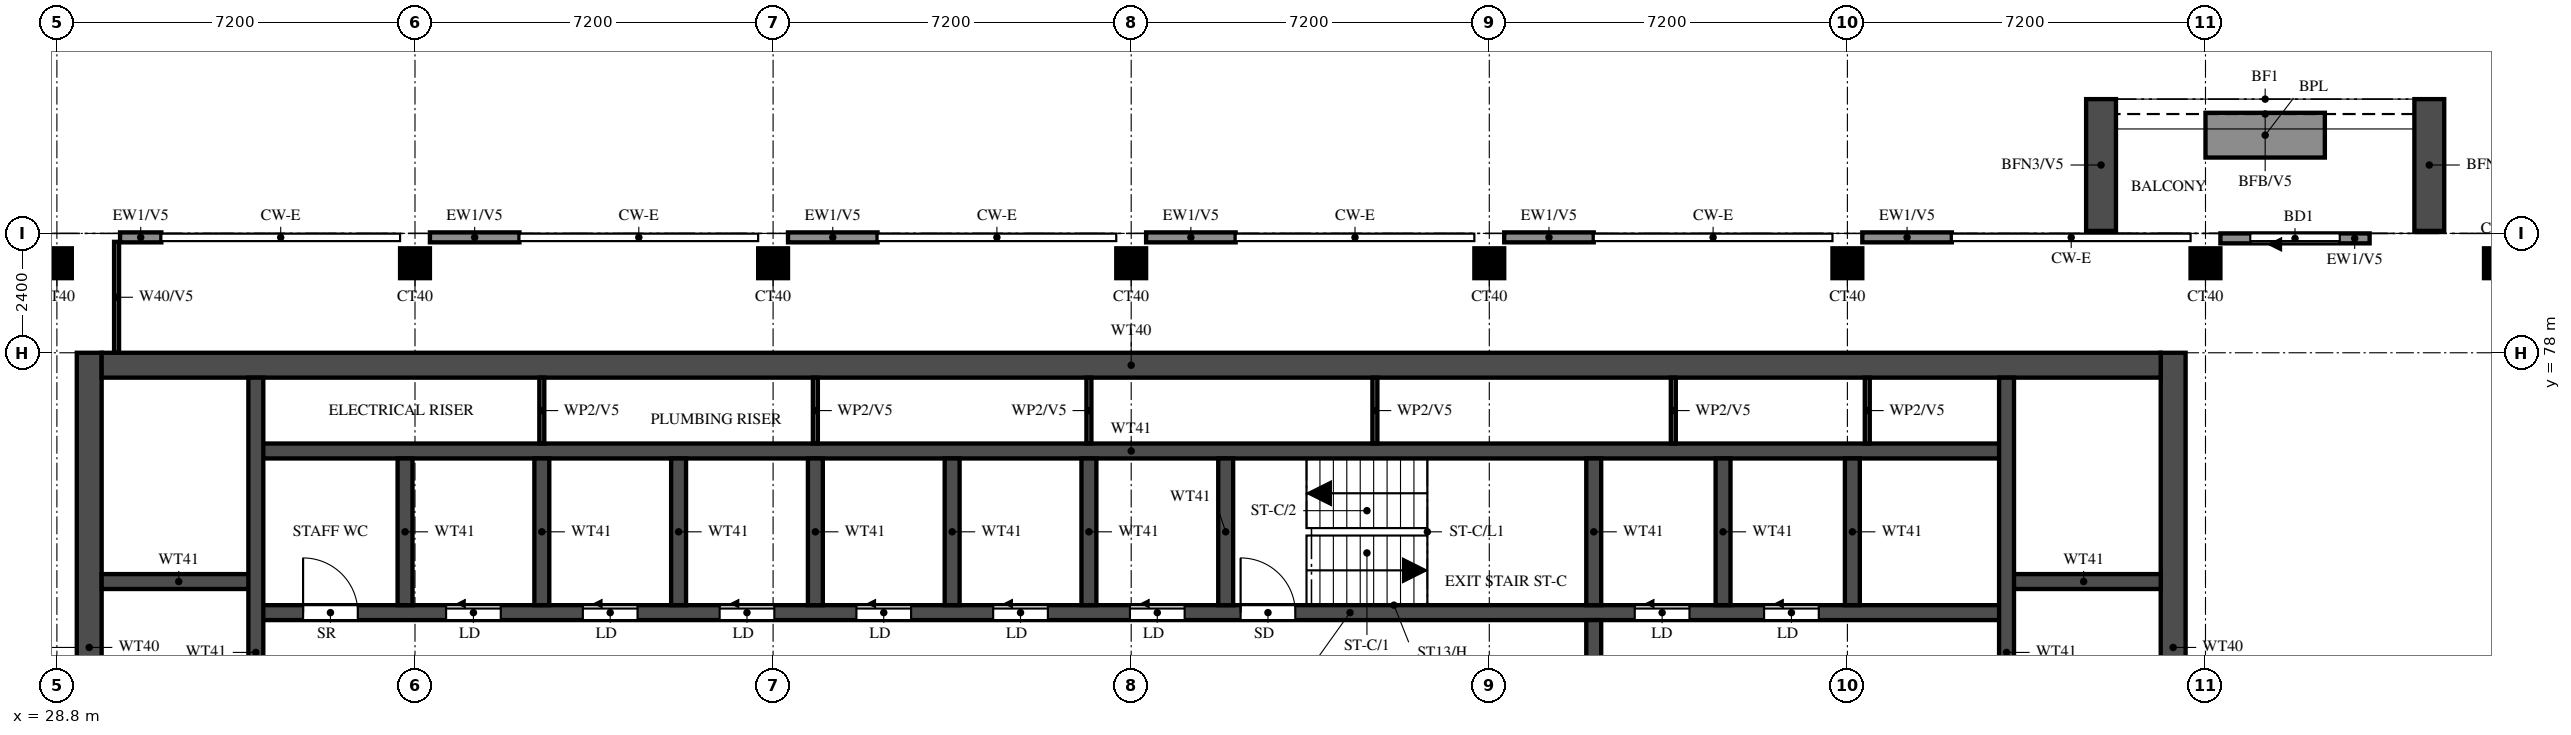
"""IFC4 building model, lengths in metres.
Left out: names, types, materials, properties, quantities, classifications, styles, units other than length and angle.
Written with IfcOpenShell. Run it as: python <this file> out.ifc"""

import sys

from ifc_helpers import new_model, si_unit, direction, frame, frame_2d, origin, origin_2d, place, context, subcontext, project, spatial, rectangle, extrude, source, transform, mapped, element, fill, save


model = new_model("IFC4")
c1 = context("Model", 3, precision=1e-05, world=origin(), true_north=direction((0.0, 1.0)))
c2 = subcontext(c1, "Body", "Model", "MODEL_VIEW")
j1 = project(units=[si_unit("LENGTHUNIT", "METRE"), si_unit("PLANEANGLEUNIT", "RADIAN")], contexts=[c1])
p1 = place(None, origin())
s1 = spatial("IfcSite", under=j1, at=p1, CompositionType="ELEMENT")
p2 = place(p1, origin())
s2 = spatial("IfcBuilding", under=s1, at=p2, CompositionType="ELEMENT")
p3 = place(p2, frame((0.0, 0.0, 271.0)))
s3 = spatial("IfcBuildingStorey", under=s2, at=p3, CompositionType="ELEMENT", Elevation=271.0)
m1 = source(origin(), c2, "Body", "SweptSolid", [
    extrude(rectangle(XDim=0.6, YDim=0.6, at=origin_2d()), origin(), (0.0, 0.0, 1.0), 3.15),
])
for number, where, z_axis, x_axis in (
    (1, (28.8, 79.8, 0.0), (0.0, 0.0, 1.0), (1.0, 0.0, 0.0)),
    (2, (36.0, 79.8, 0.0), (0.0, 0.0, 1.0), (1.0, 0.0, 0.0)),
    (3, (43.2, 79.8, 0.0), (0.0, 0.0, 1.0), (1.0, 0.0, 0.0)),
    (4, (50.4, 79.8, 0.0), (0.0, 0.0, 1.0), (1.0, 0.0, 0.0)),
    (5, (57.6, 79.8, 0.0), (0.0, 0.0, 1.0), (1.0, 0.0, 0.0)),
    (6, (64.8, 79.8, 0.0), (0.0, 0.0, 1.0), (1.0, 0.0, 0.0)),
    (7, (72.0, 79.8, 0.0), (0.0, 0.0, 1.0), (1.0, 0.0, 0.0)),
    (8, (77.9, 79.8, 0.0), (0.0, 0.0, 1.0), (1.0, 0.0, 0.0)),
):
    element("IfcColumn", number, at=place(p3, frame(where, z_axis=z_axis, x_axis=x_axis)), inside=s3, PredefinedType="COLUMN", context=c2, shape_type="MappedRepresentation", body=[
        mapped(m1, transform((0.0, 0.0, 0.0))),
    ])
for number, where, z_axis, x_axis in (
    (9, (29.45, 66.15, 0.0), (0.0, 0.0, 1.0), (0.0, 1.0, 0.0)),
    (10, (71.35, 66.15, 0.0), (0.0, 0.0, 1.0), (0.0, 1.0, 0.0)),
):
    element("IfcWall", number, at=place(p3, frame(where, z_axis=z_axis, x_axis=x_axis)), inside=s3, PredefinedType="SHEAR", context=c2, shape_type="SweptSolid", body=[
        extrude(rectangle(XDim=11.85, YDim=0.5, at=frame_2d((5.925, 0.0))), origin(), (0.0, 0.0, 1.0), 3.15),
    ])
p4 = place(p3, frame((29.7, 77.75, 0.0), z_axis=(0.0, 0.0, 1.0), x_axis=(1.0, 0.0, 0.0)))
e11 = element("IfcWall", 11, at=p4, inside=s3, PredefinedType="SHEAR", context=c2, shape_type="SweptSolid", body=[
    extrude(rectangle(XDim=41.4, YDim=0.5, at=frame_2d((20.7, 0.0))), origin(), (0.0, 0.0, 1.0), 3.15),
])
p5 = place(p3, frame((32.8, 72.775, 0.0), z_axis=(0.0, 0.0, 1.0), x_axis=(1.0, 0.0, 0.0)))
e12 = element("IfcWall", 12, at=p5, inside=s3, PredefinedType="SHEAR", context=c2, shape_type="SweptSolid", body=[
    extrude(rectangle(XDim=35.2, YDim=0.3, at=frame_2d((17.6, 0.0))), origin(), (0.0, 0.0, 1.0), 3.15),
])
p6 = place(p5, frame((19.8, 0.0, 0.0)))
e13 = element("IfcOpeningElement", 13, at=p6, cuts=e12, PredefinedType="OPENING", context=c2, shape_type="SweptSolid", body=[
    extrude(rectangle(XDim=1.1, YDim=2.1, at=frame_2d((0.55, 1.05))), frame((0.0, 0.16, 0.0), z_axis=(0.0, -1.0, 0.0), x_axis=(1.0, 0.0, 0.0)), (0.0, 0.0, 1.0), 0.32),
])
p7 = place(p5, frame((27.725, 0.0, 0.0)))
e14 = element("IfcOpeningElement", 14, at=p7, cuts=e12, PredefinedType="OPENING", context=c2, shape_type="SweptSolid", body=[
    extrude(rectangle(XDim=1.1, YDim=2.1, at=frame_2d((0.55, 1.05))), frame((0.0, 0.16, 0.0), z_axis=(0.0, -1.0, 0.0), x_axis=(1.0, 0.0, 0.0)), (0.0, 0.0, 1.0), 0.32),
])
p8 = place(p5, frame((30.325, 0.0, 0.0)))
e15 = element("IfcOpeningElement", 15, at=p8, cuts=e12, PredefinedType="OPENING", context=c2, shape_type="SweptSolid", body=[
    extrude(rectangle(XDim=1.1, YDim=2.1, at=frame_2d((0.55, 1.05))), frame((0.0, 0.16, 0.0), z_axis=(0.0, -1.0, 0.0), x_axis=(1.0, 0.0, 0.0)), (0.0, 0.0, 1.0), 0.32),
])
p9 = place(p5, frame((3.825, 0.0, 0.0)))
e16 = element("IfcOpeningElement", 16, at=p9, cuts=e12, PredefinedType="OPENING", context=c2, shape_type="SweptSolid", body=[
    extrude(rectangle(XDim=1.1, YDim=2.1, at=frame_2d((0.55, 1.05))), frame((0.0, 0.16, 0.0), z_axis=(0.0, -1.0, 0.0), x_axis=(1.0, 0.0, 0.0)), (0.0, 0.0, 1.0), 0.32),
])
p10 = place(p5, frame((6.575, 0.0, 0.0)))
e17 = element("IfcOpeningElement", 17, at=p10, cuts=e12, PredefinedType="OPENING", context=c2, shape_type="SweptSolid", body=[
    extrude(rectangle(XDim=1.1, YDim=2.1, at=frame_2d((0.55, 1.05))), frame((0.0, 0.16, 0.0), z_axis=(0.0, -1.0, 0.0), x_axis=(1.0, 0.0, 0.0)), (0.0, 0.0, 1.0), 0.32),
])
p11 = place(p5, frame((9.325, 0.0, 0.0)))
e18 = element("IfcOpeningElement", 18, at=p11, cuts=e12, PredefinedType="OPENING", context=c2, shape_type="SweptSolid", body=[
    extrude(rectangle(XDim=1.1, YDim=2.1, at=frame_2d((0.55, 1.05))), frame((0.0, 0.16, 0.0), z_axis=(0.0, -1.0, 0.0), x_axis=(1.0, 0.0, 0.0)), (0.0, 0.0, 1.0), 0.32),
])
p12 = place(p5, frame((12.075, 0.0, 0.0)))
e19 = element("IfcOpeningElement", 19, at=p12, cuts=e12, PredefinedType="OPENING", context=c2, shape_type="SweptSolid", body=[
    extrude(rectangle(XDim=1.1, YDim=2.1, at=frame_2d((0.55, 1.05))), frame((0.0, 0.16, 0.0), z_axis=(0.0, -1.0, 0.0), x_axis=(1.0, 0.0, 0.0)), (0.0, 0.0, 1.0), 0.32),
])
p13 = place(p5, frame((14.825, 0.0, 0.0)))
e20 = element("IfcOpeningElement", 20, at=p13, cuts=e12, PredefinedType="OPENING", context=c2, shape_type="SweptSolid", body=[
    extrude(rectangle(XDim=1.1, YDim=2.1, at=frame_2d((0.55, 1.05))), frame((0.0, 0.16, 0.0), z_axis=(0.0, -1.0, 0.0), x_axis=(1.0, 0.0, 0.0)), (0.0, 0.0, 1.0), 0.32),
])
p14 = place(p5, frame((17.575, 0.0, 0.0)))
e21 = element("IfcOpeningElement", 21, at=p14, cuts=e12, PredefinedType="OPENING", context=c2, shape_type="SweptSolid", body=[
    extrude(rectangle(XDim=1.1, YDim=2.1, at=frame_2d((0.55, 1.05))), frame((0.0, 0.16, 0.0), z_axis=(0.0, -1.0, 0.0), x_axis=(1.0, 0.0, 0.0)), (0.0, 0.0, 1.0), 0.32),
])
p15 = place(p5, frame((0.95, 0.0, 0.0)))
e22 = element("IfcOpeningElement", 22, at=p15, cuts=e12, PredefinedType="OPENING", context=c2, shape_type="SweptSolid", body=[
    extrude(rectangle(XDim=1.1, YDim=2.1, at=frame_2d((0.55, 1.05))), frame((0.0, 0.16, 0.0), z_axis=(0.0, -1.0, 0.0), x_axis=(1.0, 0.0, 0.0)), (0.0, 0.0, 1.0), 0.32),
])
p16 = place(p3, frame((32.8, 76.025, 0.0), z_axis=(0.0, 0.0, 1.0), x_axis=(1.0, 0.0, 0.0)))
e23 = element("IfcWall", 23, at=p16, inside=s3, PredefinedType="SHEAR", context=c2, shape_type="SweptSolid", body=[
    extrude(rectangle(XDim=35.2, YDim=0.3, at=frame_2d((17.6, 0.0))), origin(), (0.0, 0.0, 1.0), 3.15),
])
for number, where, z_axis, x_axis in (
    (24, (29.7, 73.4, 0.0), (0.0, 0.0, 1.0), (1.0, 0.0, 0.0)),
    (25, (68.0, 73.4, 0.0), (0.0, 0.0, 1.0), (1.0, 0.0, 0.0)),
):
    element("IfcWall", number, at=place(p3, frame(where, z_axis=z_axis, x_axis=x_axis)), inside=s3, PredefinedType="SHEAR", context=c2, shape_type="SweptSolid", body=[
        extrude(rectangle(XDim=3.1, YDim=0.3, at=frame_2d((1.55, 0.0))), origin(), (0.0, 0.0, 1.0), 3.15),
    ])
p17 = place(p3, frame((32.8, 66.45, 0.0), z_axis=(0.0, 0.0, 1.0), x_axis=(0.0, 1.0, 0.0)))
e26 = element("IfcWall", 26, at=p17, inside=s3, PredefinedType="SHEAR", context=c2, shape_type="SweptSolid", body=[
    extrude(rectangle(XDim=11.05, YDim=0.3, at=frame_2d((5.525, 0.0))), origin(), (0.0, 0.0, 1.0), 3.15),
])
p18 = place(p3, frame((68.0, 66.45, 0.0), z_axis=(0.0, 0.0, 1.0), x_axis=(0.0, 1.0, 0.0)))
e27 = element("IfcWall", 27, at=p18, inside=s3, PredefinedType="SHEAR", context=c2, shape_type="SweptSolid", body=[
    extrude(rectangle(XDim=11.05, YDim=0.3, at=frame_2d((5.525, 0.0))), origin(), (0.0, 0.0, 1.0), 3.15),
])
p19 = place(p18, frame((0.15, 0.0, 0.0)))
e28 = element("IfcOpeningElement", 28, at=p19, cuts=e27, PredefinedType="OPENING", context=c2, shape_type="SweptSolid", body=[
    extrude(rectangle(XDim=1.1, YDim=2.1, at=frame_2d((0.55, 1.05))), frame((0.0, 0.16, 0.0), z_axis=(0.0, -1.0, 0.0), x_axis=(1.0, 0.0, 0.0)), (0.0, 0.0, 1.0), 0.32),
])
p20 = place(p3, frame((59.7, 66.45, 0.0), z_axis=(0.0, 0.0, 1.0), x_axis=(0.0, 1.0, 0.0)))
e29 = element("IfcWall", 29, at=p20, inside=s3, PredefinedType="SHEAR", context=c2, shape_type="SweptSolid", body=[
    extrude(rectangle(XDim=6.175, YDim=0.3, at=frame_2d((3.087, 0.0))), origin(), (0.0, 0.0, 1.0), 3.15),
])
p21 = place(p20, frame((3.85, 0.0, 0.0)))
e30 = element("IfcOpeningElement", 30, at=p21, cuts=e29, PredefinedType="OPENING", context=c2, shape_type="SweptSolid", body=[
    extrude(rectangle(XDim=1.2, YDim=2.1, at=frame_2d((0.6, 1.05))), frame((0.0, 0.16, 0.0), z_axis=(0.0, -1.0, 0.0), x_axis=(1.0, 0.0, 0.0)), (0.0, 0.0, 1.0), 0.32),
])
for number, where, z_axis, x_axis in (
    (31, (59.7, 72.925, 0.0), (0.0, 0.0, 1.0), (0.0, 1.0, 0.0)),
    (32, (35.8, 72.925, 0.0), (0.0, 0.0, 1.0), (0.0, 1.0, 0.0)),
    (33, (38.55, 72.925, 0.0), (0.0, 0.0, 1.0), (0.0, 1.0, 0.0)),
    (34, (41.3, 72.925, 0.0), (0.0, 0.0, 1.0), (0.0, 1.0, 0.0)),
    (35, (44.05, 72.925, 0.0), (0.0, 0.0, 1.0), (0.0, 1.0, 0.0)),
    (36, (46.8, 72.925, 0.0), (0.0, 0.0, 1.0), (0.0, 1.0, 0.0)),
    (37, (49.55, 72.925, 0.0), (0.0, 0.0, 1.0), (0.0, 1.0, 0.0)),
    (38, (52.3, 72.925, 0.0), (0.0, 0.0, 1.0), (0.0, 1.0, 0.0)),
    (39, (62.3, 72.925, 0.0), (0.0, 0.0, 1.0), (0.0, 1.0, 0.0)),
    (40, (64.9, 72.925, 0.0), (0.0, 0.0, 1.0), (0.0, 1.0, 0.0)),
):
    element("IfcWall", number, at=place(p3, frame(where, z_axis=z_axis, x_axis=x_axis)), inside=s3, PredefinedType="SHEAR", context=c2, shape_type="SweptSolid", body=[
        extrude(rectangle(XDim=2.95, YDim=0.3, at=frame_2d((1.475, 0.0))), origin(), (0.0, 0.0, 1.0), 3.15),
    ])
p22 = place(p3, frame((75.3, 80.3, 0.0), z_axis=(0.0, 0.0, 1.0), x_axis=(-1.0, 0.0, 0.0)))
e41 = element("IfcWall", 41, at=p22, inside=s3, PredefinedType="SOLIDWALL", context=c2, shape_type="SweptSolid", body=[
    extrude(rectangle(XDim=3.0, YDim=0.2, at=frame_2d((1.5, 0.0))), origin(), (0.0, 0.0, 1.0), 3.15),
])
p23 = place(p22, frame((0.6, 0.0, 0.0)))
e42 = element("IfcOpeningElement", 42, at=p23, cuts=e41, PredefinedType="OPENING", context=c2, shape_type="SweptSolid", body=[
    extrude(rectangle(XDim=1.8, YDim=2.4, at=frame_2d((0.9, 1.2))), frame((0.0, 0.11, 0.0), z_axis=(0.0, -1.0, 0.0), x_axis=(1.0, 0.0, 0.0)), (0.0, 0.0, 1.0), 0.22),
])
p24 = place(p3, frame((66.9, 80.32, 0.0), z_axis=(0.0, 0.0, 1.0), x_axis=(-1.0, 0.0, 0.0)))
e43 = element("IfcWall", 43, at=p24, inside=s3, PredefinedType="SOLIDWALL", context=c2, shape_type="SweptSolid", body=[
    extrude(rectangle(XDim=1.8, YDim=0.2, at=frame_2d((0.9, 0.0))), origin(), (0.0, 0.0, 1.0), 3.15),
])
for number, where, z_axis, x_axis in (
    (44, (59.7, 80.32, 0.0), (0.0, 0.0, 1.0), (-1.0, 0.0, 0.0)),
    (45, (52.5, 80.32, 0.0), (0.0, 0.0, 1.0), (-1.0, 0.0, 0.0)),
    (46, (45.3, 80.32, 0.0), (0.0, 0.0, 1.0), (-1.0, 0.0, 0.0)),
    (47, (38.1, 80.32, 0.0), (0.0, 0.0, 1.0), (-1.0, 0.0, 0.0)),
):
    element("IfcWall", number, at=place(p3, frame(where, z_axis=z_axis, x_axis=x_axis)), inside=s3, PredefinedType="SOLIDWALL", context=c2, shape_type="SweptSolid", body=[
        extrude(rectangle(XDim=1.8, YDim=0.2, at=frame_2d((0.9, 0.0))), origin(), (0.0, 0.0, 1.0), 3.15),
    ])
p25 = place(p3, frame((30.9, 80.32, 0.0), z_axis=(0.0, 0.0, 1.0), x_axis=(-1.0, 0.0, 0.0)))
e48 = element("IfcWall", 48, at=p25, inside=s3, PredefinedType="SOLIDWALL", context=c2, shape_type="SweptSolid", body=[
    extrude(rectangle(XDim=0.83, YDim=0.2, at=frame_2d((0.415, 0.0))), origin(), (0.0, 0.0, 1.0), 3.15),
])
for number, where, z_axis, x_axis in (
    (49, (76.5, 80.45, 0.0), (0.0, 0.0, 1.0), (0.0, 1.0, 0.0)),
    (50, (69.9, 80.45, 0.0), (0.0, 0.0, 1.0), (0.0, 1.0, 0.0)),
):
    element("IfcWall", number, at=place(p3, frame(where, z_axis=z_axis, x_axis=x_axis)), inside=s3, PredefinedType="SOLIDWALL", context=c2, shape_type="SweptSolid", body=[
        extrude(rectangle(XDim=2.65, YDim=0.6, at=frame_2d((1.325, 0.0))), origin(), (0.0, 0.0, 1.0), 2.901),
    ])
p26 = place(p3, frame((74.4, 82.375, 0.0), z_axis=(0.0, 0.0, 1.0), x_axis=(-1.0, 0.0, 0.0)))
e51 = element("IfcWall", 51, at=p26, inside=s3, PredefinedType="SOLIDWALL", context=c2, shape_type="SweptSolid", body=[
    extrude(rectangle(XDim=2.4, YDim=0.9, at=frame_2d((1.2, 0.0))), origin(), (0.0, 0.0, 1.0), 0.9),
])
for number, where, z_axis, x_axis in (
    (52, (38.55, 76.175, 0.0), (0.0, 0.0, 1.0), (0.0, 1.0, 0.0)),
    (53, (44.05, 76.175, 0.0), (0.0, 0.0, 1.0), (0.0, 1.0, 0.0)),
    (54, (49.55, 76.175, 0.0), (0.0, 0.0, 1.0), (0.0, 1.0, 0.0)),
    (55, (55.3, 76.175, 0.0), (0.0, 0.0, 1.0), (0.0, 1.0, 0.0)),
    (56, (61.3, 76.175, 0.0), (0.0, 0.0, 1.0), (0.0, 1.0, 0.0)),
    (57, (65.2, 76.175, 0.0), (0.0, 0.0, 1.0), (0.0, 1.0, 0.0)),
):
    element("IfcWall", number, at=place(p3, frame(where, z_axis=z_axis, x_axis=x_axis)), inside=s3, PredefinedType="PARTITIONING", context=c2, shape_type="SweptSolid", body=[
        extrude(rectangle(XDim=1.325, YDim=0.1, at=frame_2d((0.663, 0.0))), origin(), (0.0, 0.0, 1.0), 3.15),
    ])
p27 = place(p3, frame((30.0, 78.002, 0.0), z_axis=(0.0, 0.0, 1.0), x_axis=(0.0, 1.0, 0.0)))
e58 = element("IfcWall", 58, at=p27, inside=s3, PredefinedType="PARTITIONING", context=c2, shape_type="SweptSolid", body=[
    extrude(rectangle(XDim=2.228, YDim=0.1, at=frame_2d((1.114, 0.0))), origin(), (0.0, 0.0, 1.0), 2.25),
])
p28 = place(p23, origin())
e59 = element("IfcDoor", 59, at=p28, inside=s3, OperationType="DOUBLE_DOOR_SLIDING", PredefinedType="DOOR", context=c2, shape_type="SweptSolid", body=[
    extrude(rectangle(XDim=1.8, YDim=2.4, at=frame_2d((0.9, 1.2))), frame((0.0, 0.025, 0.0), z_axis=(0.0, -1.0, 0.0), x_axis=(1.0, 0.0, 0.0)), (0.0, 0.0, 1.0), 0.05),
])
fill(e42, e59)
p29 = place(p6, origin())
e60 = element("IfcDoor", 60, at=p29, inside=s3, OperationType="SINGLE_SWING_LEFT", PredefinedType="DOOR", context=c2, shape_type="SweptSolid", body=[
    extrude(rectangle(XDim=1.1, YDim=2.1, at=frame_2d((0.55, 1.05))), frame((0.0, 0.025, 0.0), z_axis=(0.0, -1.0, 0.0), x_axis=(1.0, 0.0, 0.0)), (0.0, 0.0, 1.0), 0.05),
])
fill(e13, e60)
p30 = place(p7, origin())
e61 = element("IfcDoor", 61, at=p30, inside=s3, OperationType="SLIDING_TO_LEFT", PredefinedType="DOOR", context=c2, shape_type="SweptSolid", body=[
    extrude(rectangle(XDim=1.1, YDim=2.1, at=frame_2d((0.55, 1.05))), frame((0.0, 0.025, 0.0), z_axis=(0.0, -1.0, 0.0), x_axis=(1.0, 0.0, 0.0)), (0.0, 0.0, 1.0), 0.05),
])
fill(e14, e61)
p31 = place(p8, origin())
e62 = element("IfcDoor", 62, at=p31, inside=s3, OperationType="SLIDING_TO_LEFT", PredefinedType="DOOR", context=c2, shape_type="SweptSolid", body=[
    extrude(rectangle(XDim=1.1, YDim=2.1, at=frame_2d((0.55, 1.05))), frame((0.0, 0.025, 0.0), z_axis=(0.0, -1.0, 0.0), x_axis=(1.0, 0.0, 0.0)), (0.0, 0.0, 1.0), 0.05),
])
fill(e15, e62)
p32 = place(p9, origin())
e63 = element("IfcDoor", 63, at=p32, inside=s3, OperationType="SLIDING_TO_LEFT", PredefinedType="DOOR", context=c2, shape_type="SweptSolid", body=[
    extrude(rectangle(XDim=1.1, YDim=2.1, at=frame_2d((0.55, 1.05))), frame((0.0, 0.025, 0.0), z_axis=(0.0, -1.0, 0.0), x_axis=(1.0, 0.0, 0.0)), (0.0, 0.0, 1.0), 0.05),
])
fill(e16, e63)
p33 = place(p10, origin())
e64 = element("IfcDoor", 64, at=p33, inside=s3, OperationType="SLIDING_TO_LEFT", PredefinedType="DOOR", context=c2, shape_type="SweptSolid", body=[
    extrude(rectangle(XDim=1.1, YDim=2.1, at=frame_2d((0.55, 1.05))), frame((0.0, 0.025, 0.0), z_axis=(0.0, -1.0, 0.0), x_axis=(1.0, 0.0, 0.0)), (0.0, 0.0, 1.0), 0.05),
])
fill(e17, e64)
p34 = place(p11, origin())
e65 = element("IfcDoor", 65, at=p34, inside=s3, OperationType="SLIDING_TO_LEFT", PredefinedType="DOOR", context=c2, shape_type="SweptSolid", body=[
    extrude(rectangle(XDim=1.1, YDim=2.1, at=frame_2d((0.55, 1.05))), frame((0.0, 0.025, 0.0), z_axis=(0.0, -1.0, 0.0), x_axis=(1.0, 0.0, 0.0)), (0.0, 0.0, 1.0), 0.05),
])
fill(e18, e65)
p35 = place(p12, origin())
e66 = element("IfcDoor", 66, at=p35, inside=s3, OperationType="SLIDING_TO_LEFT", PredefinedType="DOOR", context=c2, shape_type="SweptSolid", body=[
    extrude(rectangle(XDim=1.1, YDim=2.1, at=frame_2d((0.55, 1.05))), frame((0.0, 0.025, 0.0), z_axis=(0.0, -1.0, 0.0), x_axis=(1.0, 0.0, 0.0)), (0.0, 0.0, 1.0), 0.05),
])
fill(e19, e66)
p36 = place(p13, origin())
e67 = element("IfcDoor", 67, at=p36, inside=s3, OperationType="SLIDING_TO_LEFT", PredefinedType="DOOR", context=c2, shape_type="SweptSolid", body=[
    extrude(rectangle(XDim=1.1, YDim=2.1, at=frame_2d((0.55, 1.05))), frame((0.0, 0.025, 0.0), z_axis=(0.0, -1.0, 0.0), x_axis=(1.0, 0.0, 0.0)), (0.0, 0.0, 1.0), 0.05),
])
fill(e20, e67)
p37 = place(p14, origin())
e68 = element("IfcDoor", 68, at=p37, inside=s3, OperationType="SLIDING_TO_LEFT", PredefinedType="DOOR", context=c2, shape_type="SweptSolid", body=[
    extrude(rectangle(XDim=1.1, YDim=2.1, at=frame_2d((0.55, 1.05))), frame((0.0, 0.025, 0.0), z_axis=(0.0, -1.0, 0.0), x_axis=(1.0, 0.0, 0.0)), (0.0, 0.0, 1.0), 0.05),
])
fill(e21, e68)
p38 = place(p15, origin())
e69 = element("IfcDoor", 69, at=p38, inside=s3, OperationType="SINGLE_SWING_LEFT", PredefinedType="DOOR", context=c2, shape_type="SweptSolid", body=[
    extrude(rectangle(XDim=1.1, YDim=2.1, at=frame_2d((0.55, 1.05))), frame((0.0, 0.025, 0.0), z_axis=(0.0, -1.0, 0.0), x_axis=(1.0, 0.0, 0.0)), (0.0, 0.0, 1.0), 0.05),
])
fill(e22, e69)
save(model, sys.argv[1])
